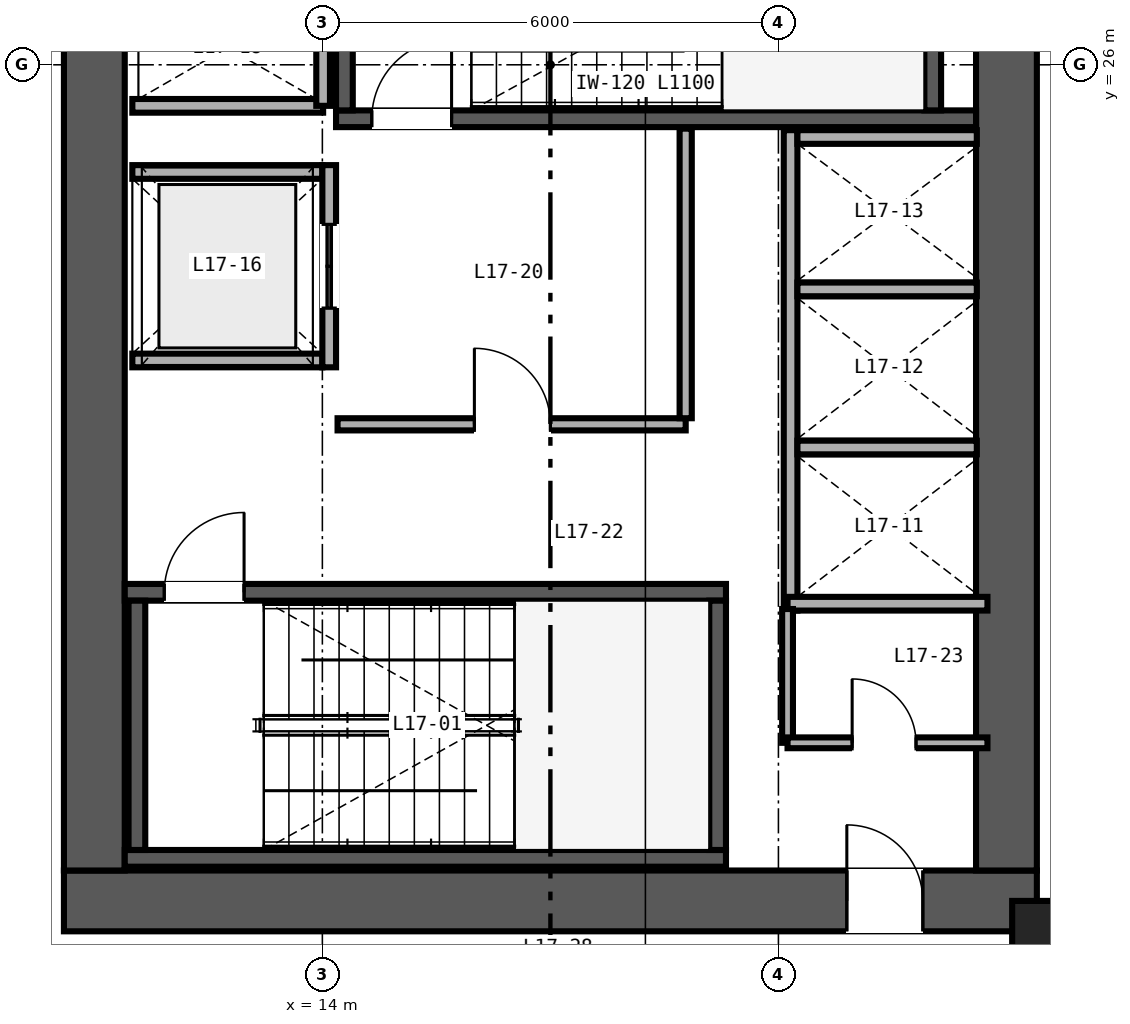
"""IFC4 building model, lengths in metres.
Left out: names, types, materials, properties, quantities, classifications, styles, units other than length and angle.
Written with IfcOpenShell. Run it as: python <this file> out.ifc"""

import sys

from ifc_helpers import new_model, si_unit, direction, frame, frame_2d, origin, origin_2d, place, context, subcontext, project, spatial, rectangle, hollow_rectangle, extrude, source, transform, mapped, element, fill, save


model = new_model("IFC4")
c1 = context("Model", 3, precision=1e-05, world=origin(), true_north=direction((0.0, 1.0)))
c2 = subcontext(c1, "Body", "Model", "MODEL_VIEW")
j1 = project(units=[si_unit("LENGTHUNIT", "METRE"), si_unit("PLANEANGLEUNIT", "RADIAN")], contexts=[c1])
p1 = place(None, origin())
s1 = spatial("IfcSite", under=j1, at=p1, CompositionType="ELEMENT")
p2 = place(p1, origin())
s2 = spatial("IfcBuilding", under=s1, at=p2, CompositionType="ELEMENT")
p3 = place(p2, frame((0.0, 0.0, 70.8)))
s3 = spatial("IfcBuildingStorey", under=s2, at=p3, CompositionType="ELEMENT", Elevation=70.8)
p4 = place(p3, frame((10.6, 15.0, 0.0), z_axis=(0.0, 0.0, 1.0), x_axis=(1.0, 0.0, 0.0)))
e1 = element("IfcWall", 1, at=p4, inside=s3, PredefinedType="SHEAR", context=c2, shape_type="SweptSolid", body=[
    extrude(rectangle(XDim=12.8, YDim=0.8, at=frame_2d((6.4, 0.0))), origin(), (0.0, 0.0, 1.0), 3.35),
])
p5 = place(p4, frame((10.3, 0.0, 0.0)))
e2 = element("IfcOpeningElement", 2, at=p5, cuts=e1, PredefinedType="OPENING", context=c2, shape_type="SweptSolid", body=[
    extrude(rectangle(XDim=1.0, YDim=2.15, at=frame_2d((0.5, 1.075))), frame((0.0, 0.41, 0.0), z_axis=(0.0, -1.0, 0.0), x_axis=(1.0, 0.0, 0.0)), (0.0, 0.0, 1.0), 0.82),
])
for number, where, z_axis, x_axis in (
    (3, (11.0, 15.4, 0.0), (0.0, 0.0, 1.0), (0.0, 1.0, 0.0)),
    (4, (23.0, 15.4, 0.0), (0.0, 0.0, 1.0), (0.0, 1.0, 0.0)),
):
    element("IfcWall", number, at=place(p3, frame(where, z_axis=z_axis, x_axis=x_axis)), inside=s3, PredefinedType="SHEAR", context=c2, shape_type="SweptSolid", body=[
        extrude(rectangle(XDim=21.2, YDim=0.8, at=frame_2d((10.6, 0.0))), origin(), (0.0, 0.0, 1.0), 3.35),
    ])
p6 = place(p3, frame((11.4, 15.56, 0.0), z_axis=(0.0, 0.0, 1.0), x_axis=(1.0, 0.0, 0.0)))
e5 = element("IfcWall", 5, at=p6, inside=s3, PredefinedType="SHEAR", context=c2, shape_type="SweptSolid", body=[
    extrude(rectangle(XDim=7.91, YDim=0.22, at=frame_2d((3.955, 0.0))), origin(), (0.0, 0.0, 1.0), 3.4),
])
p7 = place(p3, frame((11.4, 19.06, 0.0), z_axis=(0.0, 0.0, 1.0), x_axis=(1.0, 0.0, 0.0)))
e6 = element("IfcWall", 6, at=p7, inside=s3, PredefinedType="SHEAR", context=c2, shape_type="SweptSolid", body=[
    extrude(rectangle(XDim=7.91, YDim=0.22, at=frame_2d((3.955, 0.0))), origin(), (0.0, 0.0, 1.0), 3.4),
])
p8 = place(p7, frame((0.52, 0.0, 0.0)))
e7 = element("IfcOpeningElement", 7, at=p8, cuts=e6, PredefinedType="OPENING", context=c2, shape_type="SweptSolid", body=[
    extrude(rectangle(XDim=1.05, YDim=2.15, at=frame_2d((0.525, 1.075))), frame((0.0, 0.12, 0.0), z_axis=(0.0, -1.0, 0.0), x_axis=(1.0, 0.0, 0.0)), (0.0, 0.0, 1.0), 0.24),
])
for number, where, z_axis, x_axis in (
    (8, (11.56, 15.67, 0.0), (0.0, 0.0, 1.0), (0.0, 1.0, 0.0)),
    (9, (19.2, 15.67, 0.0), (0.0, 0.0, 1.0), (0.0, 1.0, 0.0)),
):
    element("IfcWall", number, at=place(p3, frame(where, z_axis=z_axis, x_axis=x_axis)), inside=s3, PredefinedType="SHEAR", context=c2, shape_type="SweptSolid", body=[
        extrude(rectangle(XDim=3.28, YDim=0.22, at=frame_2d((1.64, 0.0))), origin(), (0.0, 0.0, 1.0), 3.4),
    ])
p9 = place(p3, frame((14.18, 25.29, 0.0), z_axis=(0.0, 0.0, 1.0), x_axis=(1.0, 0.0, 0.0)))
e10 = element("IfcWall", 10, at=p9, inside=s3, PredefinedType="SHEAR", context=c2, shape_type="SweptSolid", body=[
    extrude(rectangle(XDim=8.42, YDim=0.22, at=frame_2d((4.21, 0.0))), origin(), (0.0, 0.0, 1.0), 3.4),
])
p10 = place(p9, frame((0.47, 0.0, 0.0)))
e11 = element("IfcOpeningElement", 11, at=p10, cuts=e10, PredefinedType="OPENING", context=c2, shape_type="SweptSolid", body=[
    extrude(rectangle(XDim=1.05, YDim=2.15, at=frame_2d((0.525, 1.075))), frame((0.0, 0.12, 0.0), z_axis=(0.0, -1.0, 0.0), x_axis=(1.0, 0.0, 0.0)), (0.0, 0.0, 1.0), 0.24),
])
for number, where, z_axis, x_axis in (
    (12, (14.29, 25.4, 0.0), (0.0, 0.0, 1.0), (0.0, 1.0, 0.0)),
    (13, (22.03, 25.4, 0.0), (0.0, 0.0, 1.0), (0.0, 1.0, 0.0)),
):
    element("IfcWall", number, at=place(p3, frame(where, z_axis=z_axis, x_axis=x_axis)), inside=s3, PredefinedType="SHEAR", context=c2, shape_type="SweptSolid", body=[
        extrude(rectangle(XDim=3.28, YDim=0.22, at=frame_2d((1.64, 0.0))), origin(), (0.0, 0.0, 1.0), 3.4),
    ])
m1 = source(origin(), c2, "Body", "SweptSolid", [
    extrude(hollow_rectangle(XDim=0.85, YDim=0.9, WallThickness=0.04, at=origin_2d()), origin(), (0.0, 0.0, 1.0), 3.35),
])
p11 = place(p3, frame((23.5, 14.55, 0.0), z_axis=(0.0, 0.0, 1.0), x_axis=(1.0, 0.0, 0.0)))
e14 = element("IfcColumn", 14, at=p11, inside=s3, PredefinedType="COLUMN", context=c2, shape_type="MappedRepresentation", body=[
    mapped(m1, transform((0.0, 0.0, 0.0), scale=1.0)),
])
p12 = place(p3, frame((20.16, 18.82, 0.0), z_axis=(0.0, 0.0, 1.0), x_axis=(0.0, 1.0, 0.0)))
e15 = element("IfcWall", 15, at=p12, inside=s3, PredefinedType="SOLIDWALL", context=c2, shape_type="SweptSolid", body=[
    extrude(rectangle(XDim=6.32, YDim=0.18, at=frame_2d((3.16, 0.0))), origin(), (0.0, 0.0, 1.0), 2.36),
])
p13 = place(p3, frame((20.12, 18.91, 0.0), z_axis=(0.0, 0.0, 1.0), x_axis=(1.0, 0.0, 0.0)))
e16 = element("IfcWall", 16, at=p13, inside=s3, PredefinedType="SOLIDWALL", context=c2, shape_type="SweptSolid", body=[
    extrude(rectangle(XDim=2.63, YDim=0.18, at=frame_2d((1.315, 0.0))), origin(), (0.0, 0.0, 1.0), 3.35),
])
p14 = place(p3, frame((20.25, 25.05, 0.0), z_axis=(0.0, 0.0, 1.0), x_axis=(1.0, 0.0, 0.0)))
e17 = element("IfcWall", 17, at=p14, inside=s3, PredefinedType="SOLIDWALL", context=c2, shape_type="SweptSolid", body=[
    extrude(rectangle(XDim=2.36, YDim=0.18, at=frame_2d((1.18, 0.0))), origin(), (0.0, 0.0, 1.0), 3.35),
])
p15 = place(p3, frame((20.25, 20.965, 0.0), z_axis=(0.0, 0.0, 1.0), x_axis=(1.0, 0.0, 0.0)))
e18 = element("IfcWall", 18, at=p15, inside=s3, PredefinedType="SOLIDWALL", context=c2, shape_type="SweptSolid", body=[
    extrude(rectangle(XDim=2.36, YDim=0.18, at=frame_2d((1.18, 0.0))), origin(), (0.0, 0.0, 1.0), 2.36),
])
p16 = place(p3, frame((20.25, 23.045, 0.0), z_axis=(0.0, 0.0, 1.0), x_axis=(1.0, 0.0, 0.0)))
e19 = element("IfcWall", 19, at=p16, inside=s3, PredefinedType="SOLIDWALL", context=c2, shape_type="SweptSolid", body=[
    extrude(rectangle(XDim=2.36, YDim=0.18, at=frame_2d((1.18, 0.0))), origin(), (0.0, 0.0, 1.0), 3.35),
])
for number, where, z_axis, x_axis in (
    (20, (11.5, 22.11, 0.0), (0.0, 0.0, 1.0), (1.0, 0.0, 0.0)),
    (21, (11.5, 24.59, 0.0), (0.0, 0.0, 1.0), (1.0, 0.0, 0.0)),
):
    element("IfcWall", number, at=place(p3, frame(where, z_axis=z_axis, x_axis=x_axis)), inside=s3, PredefinedType="SOLIDWALL", context=c2, shape_type="SweptSolid", body=[
        extrude(rectangle(XDim=2.5, YDim=0.18, at=frame_2d((1.25, 0.0))), origin(), (0.0, 0.0, 1.0), 3.35),
    ])
p17 = place(p3, frame((14.09, 22.02, 0.0), z_axis=(0.0, 0.0, 1.0), x_axis=(0.0, 1.0, 0.0)))
e22 = element("IfcWall", 22, at=p17, inside=s3, PredefinedType="SOLIDWALL", context=c2, shape_type="SweptSolid", body=[
    extrude(rectangle(XDim=2.66, YDim=0.18, at=frame_2d((1.33, 0.0))), origin(), (0.0, 0.0, 1.0), 3.35),
])
p18 = place(p17, frame((0.78, 0.0, 0.0)))
e23 = element("IfcOpeningElement", 23, at=p18, cuts=e22, PredefinedType="OPENING", context=c2, shape_type="SweptSolid", body=[
    extrude(rectangle(XDim=1.1, YDim=2.2, at=frame_2d((0.55, 1.1))), frame((0.0, 0.1, 0.0), z_axis=(0.0, -1.0, 0.0), x_axis=(1.0, 0.0, 0.0)), (0.0, 0.0, 1.0), 0.2),
])
p19 = place(p3, frame((11.5, 25.46, 0.0), z_axis=(0.0, 0.0, 1.0), x_axis=(1.0, 0.0, 0.0)))
e24 = element("IfcWall", 24, at=p19, inside=s3, PredefinedType="SOLIDWALL", context=c2, shape_type="SweptSolid", body=[
    extrude(rectangle(XDim=2.51, YDim=0.18, at=frame_2d((1.255, 0.0))), origin(), (0.0, 0.0, 1.0), 3.35),
])
p20 = place(p3, frame((14.01, 25.46, 0.0), z_axis=(0.0, 0.0, 1.0), x_axis=(0.0, 1.0, 0.0)))
e25 = element("IfcWall", 25, at=p20, inside=s3, PredefinedType="SOLIDWALL", context=c2, shape_type="SweptSolid", body=[
    extrude(rectangle(XDim=3.08, YDim=0.18, at=frame_2d((1.54, 0.0))), origin(), (0.0, 0.0, 1.0), 3.35),
])
p21 = place(p3, frame((14.2, 21.27, 0.0), z_axis=(0.0, 0.0, 1.0), x_axis=(1.0, 0.0, 0.0)))
e26 = element("IfcWall", 26, at=p21, inside=s3, PredefinedType="PARTITIONING", context=c2, shape_type="SweptSolid", body=[
    extrude(rectangle(XDim=4.58, YDim=0.16, at=frame_2d((2.29, 0.0))), origin(), (0.0, 0.0, 1.0), 3.35),
])
p22 = place(p21, frame((1.8, 0.0, 0.0)))
e27 = element("IfcOpeningElement", 27, at=p22, cuts=e26, PredefinedType="OPENING", context=c2, shape_type="SweptSolid", body=[
    extrude(rectangle(XDim=1.0, YDim=2.15, at=frame_2d((0.5, 1.075))), frame((0.0, 0.09, 0.0), z_axis=(0.0, -1.0, 0.0), x_axis=(1.0, 0.0, 0.0)), (0.0, 0.0, 1.0), 0.18),
])
p23 = place(p3, frame((18.78, 21.35, 0.0), z_axis=(0.0, 0.0, 1.0), x_axis=(0.0, 1.0, 0.0)))
e28 = element("IfcWall", 28, at=p23, inside=s3, PredefinedType="PARTITIONING", context=c2, shape_type="SweptSolid", body=[
    extrude(rectangle(XDim=3.81, YDim=0.16, at=frame_2d((1.905, 0.0))), origin(), (0.0, 0.0, 1.0), 3.35),
])
p24 = place(p3, frame((20.12, 17.08, 0.0), z_axis=(0.0, 0.0, 1.0), x_axis=(0.0, 1.0, 0.0)))
e29 = element("IfcWall", 29, at=p24, inside=s3, PredefinedType="PARTITIONING", context=c2, shape_type="SweptSolid", body=[
    extrude(rectangle(XDim=1.76, YDim=0.142, at=frame_2d((0.88, 0.0))), origin(), (0.0, 0.0, 1.0), 3.35),
])
p25 = place(p3, frame((20.12, 17.08, 0.0), z_axis=(0.0, 0.0, 1.0), x_axis=(1.0, 0.0, 0.0)))
e30 = element("IfcWall", 30, at=p25, inside=s3, PredefinedType="PARTITIONING", context=c2, shape_type="SweptSolid", body=[
    extrude(rectangle(XDim=2.63, YDim=0.142, at=frame_2d((1.315, 0.0))), origin(), (0.0, 0.0, 1.0), 3.35),
])
p26 = place(p25, frame((0.85, 0.0, 0.0)))
e31 = element("IfcOpeningElement", 31, at=p26, cuts=e30, PredefinedType="OPENING", context=c2, shape_type="SweptSolid", body=[
    extrude(rectangle(XDim=0.84, YDim=2.1, at=frame_2d((0.42, 1.05))), frame((0.0, 0.081, 0.0), z_axis=(0.0, -1.0, 0.0), x_axis=(1.0, 0.0, 0.0)), (0.0, 0.0, 1.0), 0.162),
])
m2 = source(origin(), c2, "Body", "SweptSolid", [
    extrude(rectangle(XDim=1.05, YDim=2.15, at=frame_2d((0.525, 1.075))), frame((0.0, 0.025, 0.0), z_axis=(0.0, -1.0, 0.0), x_axis=(1.0, 0.0, 0.0)), (0.0, 0.0, 1.0), 0.05),
])
p27 = place(p8, origin())
e32 = element("IfcDoor", 32, at=p27, inside=s3, OperationType="SINGLE_SWING_RIGHT", PredefinedType="DOOR", context=c2, shape_type="MappedRepresentation", body=[
    mapped(m2, transform((0.0, 0.0, 0.0), scale=1.0)),
])
fill(e7, e32)
p28 = place(p10, origin())
e33 = element("IfcDoor", 33, at=p28, inside=s3, OperationType="SINGLE_SWING_RIGHT", PredefinedType="DOOR", context=c2, shape_type="MappedRepresentation", body=[
    mapped(m2, transform((0.0, 0.0, 0.0), scale=1.0)),
])
fill(e11, e33)
m3 = source(origin(), c2, "Body", "SweptSolid", [
    extrude(rectangle(XDim=1.1, YDim=2.2, at=frame_2d((0.55, 1.1))), frame((0.0, 0.025, 0.0), z_axis=(0.0, -1.0, 0.0), x_axis=(1.0, 0.0, 0.0)), (0.0, 0.0, 1.0), 0.05),
])
p29 = place(p18, origin())
e34 = element("IfcDoor", 34, at=p29, inside=s3, OperationType="DOUBLE_DOOR_SLIDING", PredefinedType="DOOR", context=c2, shape_type="MappedRepresentation", body=[
    mapped(m3, transform((0.0, 0.0, 0.0), scale=1.0)),
])
fill(e23, e34)
m4 = source(origin(), c2, "Body", "SweptSolid", [
    extrude(rectangle(XDim=1.0, YDim=2.15, at=frame_2d((0.5, 1.075))), frame((0.0, 0.025, 0.0), z_axis=(0.0, -1.0, 0.0), x_axis=(1.0, 0.0, 0.0)), (0.0, 0.0, 1.0), 0.05),
])
p30 = place(p22, origin())
e35 = element("IfcDoor", 35, at=p30, inside=s3, OperationType="SINGLE_SWING_LEFT", PredefinedType="DOOR", context=c2, shape_type="MappedRepresentation", body=[
    mapped(m4, transform((0.0, 0.0, 0.0), scale=1.0)),
])
fill(e27, e35)
m5 = source(origin(), c2, "Body", "SweptSolid", [
    extrude(rectangle(XDim=0.84, YDim=2.1, at=frame_2d((0.42, 1.05))), frame((0.0, 0.025, 0.0), z_axis=(0.0, -1.0, 0.0), x_axis=(1.0, 0.0, 0.0)), (0.0, 0.0, 1.0), 0.05),
])
p31 = place(p26, origin())
e36 = element("IfcDoor", 36, at=p31, inside=s3, OperationType="SINGLE_SWING_LEFT", PredefinedType="DOOR", context=c2, shape_type="MappedRepresentation", body=[
    mapped(m5, transform((0.0, 0.0, 0.0), scale=1.0)),
])
fill(e31, e36)
p32 = place(p5, origin())
e37 = element("IfcDoor", 37, at=p32, inside=s3, OperationType="SINGLE_SWING_LEFT", PredefinedType="DOOR", context=c2, shape_type="MappedRepresentation", body=[
    mapped(m4, transform((0.0, 0.0, 0.0), scale=1.0)),
])
fill(e2, e37)
save(model, sys.argv[1])
